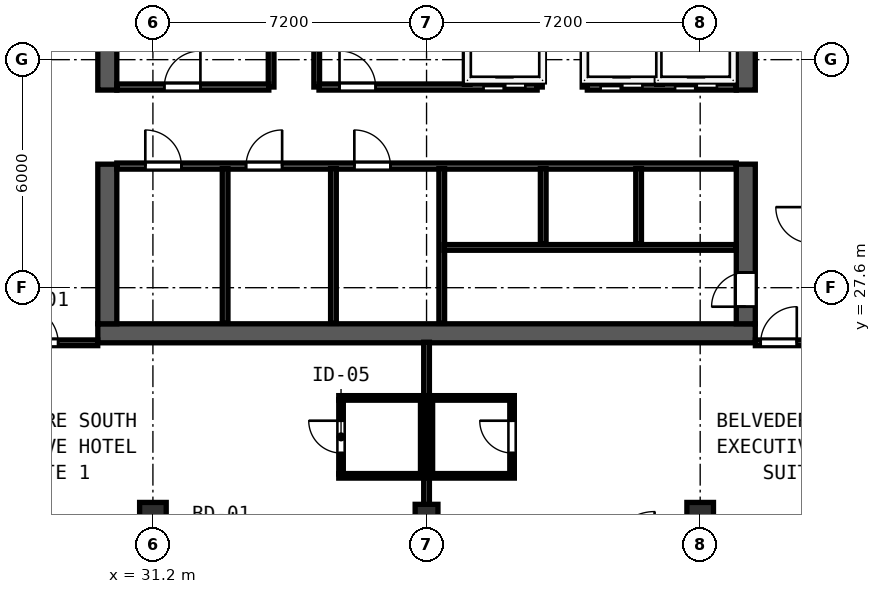
"""IFC4 building model, lengths in metres.
Left out: names, types, materials, properties, quantities, classifications, styles, units other than length and angle.
Written with IfcOpenShell. Run it as: python <this file> out.ifc"""

import sys

from ifc_helpers import new_model, si_unit, direction, frame, frame_2d, origin, origin_2d, place, context, subcontext, project, spatial, rectangle, hollow_rectangle, extrude, element, fill, save


model = new_model("IFC4")
c1 = context("Model", 3, precision=1e-05, world=origin(), true_north=direction((0.0, 1.0)))
c2 = subcontext(c1, "Body", "Model", "MODEL_VIEW")
j1 = project(units=[si_unit("LENGTHUNIT", "METRE"), si_unit("PLANEANGLEUNIT", "RADIAN")], contexts=[c1])
p1 = place(None, origin())
s1 = spatial("IfcSite", under=j1, at=p1, CompositionType="ELEMENT")
p2 = place(p1, origin())
s2 = spatial("IfcBuilding", under=s1, at=p2, CompositionType="ELEMENT")
p3 = place(p2, frame((0.0, 0.0, 286.1)))
s3 = spatial("IfcBuildingStorey", under=s2, at=p3, CompositionType="ELEMENT", Elevation=286.1)
p4 = place(p3, frame((29.75, 26.4, 0.0), z_axis=(0.0, 0.0, 1.0), x_axis=(1.0, 0.0, 0.0)))
e1 = element("IfcWall", 1, at=p4, inside=s3, PredefinedType="SHEAR", context=c2, shape_type="SweptSolid", body=[
    extrude(rectangle(XDim=17.3, YDim=0.5, at=frame_2d((8.65, 0.0))), origin(), (0.0, 0.0, 1.0), 3.72),
])
p5 = place(p3, frame((30.0, 26.65, 0.0), z_axis=(0.0, 0.0, 1.0), x_axis=(0.0, 1.0, 0.0)))
e2 = element("IfcWall", 2, at=p5, inside=s3, PredefinedType="SHEAR", context=c2, shape_type="SweptSolid", body=[
    extrude(rectangle(XDim=4.2, YDim=0.5, at=frame_2d((2.1, 0.0))), origin(), (0.0, 0.0, 1.0), 3.72),
])
p6 = place(p3, frame((30.0, 32.8, 0.0), z_axis=(0.0, 0.0, 1.0), x_axis=(0.0, 1.0, 0.0)))
e3 = element("IfcWall", 3, at=p6, inside=s3, PredefinedType="SHEAR", context=c2, shape_type="SweptSolid", body=[
    extrude(rectangle(XDim=10.15, YDim=0.5, at=frame_2d((5.075, 0.0))), origin(), (0.0, 0.0, 1.0), 3.72),
])
p7 = place(p3, frame((46.8, 26.65, 0.0), z_axis=(0.0, 0.0, 1.0), x_axis=(0.0, 1.0, 0.0)))
e4 = element("IfcWall", 4, at=p7, inside=s3, PredefinedType="SHEAR", context=c2, shape_type="SweptSolid", body=[
    extrude(rectangle(XDim=4.2, YDim=0.5, at=frame_2d((2.1, 0.0))), origin(), (0.0, 0.0, 1.0), 3.72),
])
p8 = place(p7, frame((1.35, 0.0, 0.0), z_axis=(0.0, 0.0, 1.0), x_axis=(-1.0, 0.0, 0.0)))
e5 = element("IfcOpeningElement", 5, at=p8, cuts=e4, PredefinedType="OPENING", context=c2, shape_type="SweptSolid", body=[
    extrude(rectangle(XDim=0.9, YDim=2.1, at=frame_2d((0.45, 1.05))), frame((0.0, 0.26, 0.0), z_axis=(0.0, -1.0, 0.0), x_axis=(1.0, 0.0, 0.0)), (0.0, 0.0, 1.0), 0.52),
])
p9 = place(p3, frame((46.8, 32.8, 0.0), z_axis=(0.0, 0.0, 1.0), x_axis=(0.0, 1.0, 0.0)))
e6 = element("IfcWall", 6, at=p9, inside=s3, PredefinedType="SHEAR", context=c2, shape_type="SweptSolid", body=[
    extrude(rectangle(XDim=10.15, YDim=0.5, at=frame_2d((5.075, 0.0))), origin(), (0.0, 0.0, 1.0), 3.72),
])
for number, where, z_axis, x_axis in (
    (7, (31.2, 21.6, 0.0), (0.0, 0.0, 1.0), (1.0, 0.0, 0.0)),
    (8, (45.6, 21.6, 0.0), (0.0, 0.0, 1.0), (1.0, 0.0, 0.0)),
):
    element("IfcColumn", number, at=place(p3, frame(where, z_axis=z_axis, x_axis=x_axis)), inside=s3, PredefinedType="COLUMN", context=c2, shape_type="SweptSolid", body=[
        extrude(hollow_rectangle(XDim=0.7, YDim=0.7, WallThickness=0.026, at=origin_2d()), origin(), (0.0, 0.0, 1.0), 3.9),
    ])
p10 = place(p3, frame((38.4, 21.6, 0.0), z_axis=(0.0, 0.0, 1.0), x_axis=(1.0, 0.0, 0.0)))
e9 = element("IfcColumn", 9, at=p10, inside=s3, PredefinedType="COLUMN", context=c2, shape_type="SweptSolid", body=[
    extrude(hollow_rectangle(XDim=0.6, YDim=0.6, WallThickness=0.024, at=origin_2d()), origin(), (0.0, 0.0, 1.0), 3.9),
])
p11 = place(p3, frame((47.933, 20.497, 0.0), z_axis=(0.0, 0.0, 1.0), x_axis=(0.970136341762, 0.242560257242, 0.0)))
e10 = element("IfcWall", 10, at=p11, inside=s3, PredefinedType="SOLIDWALL", context=c2, shape_type="SweptSolid", body=[
    extrude(rectangle(XDim=4.664, YDim=0.22, at=frame_2d((2.332, 0.0))), origin(), (0.0, 0.0, 1.0), 3.365),
])
p12 = place(p11, frame((0.7, 0.0, 0.85)))
e11 = element("IfcOpeningElement", 11, at=p12, cuts=e10, PredefinedType="OPENING", context=c2, shape_type="SweptSolid", body=[
    extrude(rectangle(XDim=1.25, YDim=1.95, at=frame_2d((0.625, 0.975))), frame((0.0, 0.12, 0.0), z_axis=(0.0, -1.0, 0.0), x_axis=(1.0, 0.0, 0.0)), (0.0, 0.0, 1.0), 0.24),
])
p13 = place(p3, frame((24.342, 21.628, 0.0), z_axis=(0.0, 0.0, 1.0), x_axis=(0.970136341762, -0.242560257242, 0.0)))
e12 = element("IfcWall", 12, at=p13, inside=s3, PredefinedType="SOLIDWALL", context=c2, shape_type="SweptSolid", body=[
    extrude(rectangle(XDim=4.664, YDim=0.22, at=frame_2d((2.332, 0.0))), origin(), (0.0, 0.0, 1.0), 3.365),
])
p14 = place(p13, frame((0.7, 0.0, 0.85)))
e13 = element("IfcOpeningElement", 13, at=p14, cuts=e12, PredefinedType="OPENING", context=c2, shape_type="SweptSolid", body=[
    extrude(rectangle(XDim=1.25, YDim=1.95, at=frame_2d((0.625, 0.975))), frame((0.0, 0.12, 0.0), z_axis=(0.0, -1.0, 0.0), x_axis=(1.0, 0.0, 0.0)), (0.0, 0.0, 1.0), 0.24),
])
for number, where, z_axis, x_axis in (
    (14, (34.31, 32.88, 0.0), (0.0, 0.0, 1.0), (0.0, 1.0, 0.0)),
    (15, (35.51, 32.88, 0.0), (0.0, 0.0, 1.0), (0.0, 1.0, 0.0)),
    (16, (41.37, 32.88, 0.0), (0.0, 0.0, 1.0), (0.0, 1.0, 0.0)),
    (17, (42.57, 32.88, 0.0), (0.0, 0.0, 1.0), (0.0, 1.0, 0.0)),
):
    element("IfcWall", number, at=place(p3, frame(where, z_axis=z_axis, x_axis=x_axis)), inside=s3, PredefinedType="SOLIDWALL", context=c2, shape_type="SweptSolid", body=[
        extrude(rectangle(XDim=2.17, YDim=0.15, at=frame_2d((1.085, 0.0))), origin(), (0.0, 0.0, 1.0), 3.72),
    ])
p15 = place(p3, frame((30.25, 32.88, 0.0), z_axis=(0.0, 0.0, 1.0), x_axis=(1.0, 0.0, 0.0)))
e18 = element("IfcWall", 18, at=p15, inside=s3, PredefinedType="SOLIDWALL", context=c2, shape_type="SweptSolid", body=[
    extrude(rectangle(XDim=4.0, YDim=0.16, at=frame_2d((2.0, 0.0))), origin(), (0.0, 0.0, 1.0), 3.72),
])
p16 = place(p15, frame((2.2, 0.0, 0.0), z_axis=(0.0, 0.0, 1.0), x_axis=(-1.0, 0.0, 0.0)))
e19 = element("IfcOpeningElement", 19, at=p16, cuts=e18, PredefinedType="OPENING", context=c2, shape_type="SweptSolid", body=[
    extrude(rectangle(XDim=0.95, YDim=2.12, at=frame_2d((0.475, 1.06))), frame((0.0, 0.09, 0.0), z_axis=(0.0, -1.0, 0.0), x_axis=(1.0, 0.0, 0.0)), (0.0, 0.0, 1.0), 0.18),
])
p17 = place(p3, frame((35.57, 32.88, 0.0), z_axis=(0.0, 0.0, 1.0), x_axis=(1.0, 0.0, 0.0)))
e20 = element("IfcWall", 20, at=p17, inside=s3, PredefinedType="SOLIDWALL", context=c2, shape_type="SweptSolid", body=[
    extrude(rectangle(XDim=5.74, YDim=0.16, at=frame_2d((2.87, 0.0))), origin(), (0.0, 0.0, 1.0), 3.72),
])
p18 = place(p17, frame((1.49, 0.0, 0.0), z_axis=(0.0, 0.0, 1.0), x_axis=(-1.0, 0.0, 0.0)))
e21 = element("IfcOpeningElement", 21, at=p18, cuts=e20, PredefinedType="OPENING", context=c2, shape_type="SweptSolid", body=[
    extrude(rectangle(XDim=0.95, YDim=2.12, at=frame_2d((0.475, 1.06))), frame((0.0, 0.09, 0.0), z_axis=(0.0, -1.0, 0.0), x_axis=(1.0, 0.0, 0.0)), (0.0, 0.0, 1.0), 0.18),
])
p19 = place(p17, frame((5.43, 0.0, 0.0), z_axis=(0.0, 0.0, 1.0), x_axis=(-1.0, 0.0, 0.0)))
e22 = element("IfcOpeningElement", 22, at=p19, cuts=e20, PredefinedType="OPENING", context=c2, shape_type="SweptSolid", body=[
    extrude(rectangle(XDim=1.1, YDim=2.2, at=frame_2d((0.55, 1.1))), frame((0.0, 0.09, 0.0), z_axis=(0.0, -1.0, 0.0), x_axis=(1.0, 0.0, 0.0)), (0.0, 0.0, 1.0), 0.18),
])
p20 = place(p3, frame((42.63, 32.88, 0.0), z_axis=(0.0, 0.0, 1.0), x_axis=(1.0, 0.0, 0.0)))
e23 = element("IfcWall", 23, at=p20, inside=s3, PredefinedType="SOLIDWALL", context=c2, shape_type="SweptSolid", body=[
    extrude(rectangle(XDim=3.92, YDim=0.16, at=frame_2d((1.96, 0.0))), origin(), (0.0, 0.0, 1.0), 3.72),
])
p21 = place(p20, frame((1.45, 0.0, 0.0), z_axis=(0.0, 0.0, 1.0), x_axis=(-1.0, 0.0, 0.0)))
e24 = element("IfcOpeningElement", 24, at=p21, cuts=e23, PredefinedType="OPENING", context=c2, shape_type="SweptSolid", body=[
    extrude(rectangle(XDim=1.1, YDim=2.2, at=frame_2d((0.55, 1.1))), frame((0.0, 0.09, 0.0), z_axis=(0.0, -1.0, 0.0), x_axis=(1.0, 0.0, 0.0)), (0.0, 0.0, 1.0), 0.18),
])
p22 = place(p20, frame((3.41, 0.0, 0.0), z_axis=(0.0, 0.0, 1.0), x_axis=(-1.0, 0.0, 0.0)))
e25 = element("IfcOpeningElement", 25, at=p22, cuts=e23, PredefinedType="OPENING", context=c2, shape_type="SweptSolid", body=[
    extrude(rectangle(XDim=1.1, YDim=2.2, at=frame_2d((0.55, 1.1))), frame((0.0, 0.09, 0.0), z_axis=(0.0, -1.0, 0.0), x_axis=(1.0, 0.0, 0.0)), (0.0, 0.0, 1.0), 0.18),
])
for number, where, z_axis, x_axis in (
    (26, (39.47, 32.95, 0.0), (0.0, 0.0, 1.0), (0.0, 1.0, 0.0)),
    (27, (44.53, 32.95, 0.0), (0.0, 0.0, 1.0), (0.0, 1.0, 0.0)),
):
    element("IfcWall", number, at=place(p3, frame(where, z_axis=z_axis, x_axis=x_axis)), inside=s3, PredefinedType="SOLIDWALL", context=c2, shape_type="SweptSolid", body=[
        extrude(rectangle(XDim=2.05, YDim=0.15, at=frame_2d((1.025, 0.0))), origin(), (0.0, 0.0, 1.0), 3.72),
    ])
p23 = place(p3, frame((30.25, 30.8, 0.0), z_axis=(0.0, 0.0, 1.0), x_axis=(1.0, 0.0, 0.0)))
e28 = element("IfcWall", 28, at=p23, inside=s3, PredefinedType="SOLIDWALL", context=c2, shape_type="SweptSolid", body=[
    extrude(rectangle(XDim=16.3, YDim=0.16, at=frame_2d((8.15, 0.0))), origin(), (0.0, 0.0, 1.0), 3.72),
])
p24 = place(p23, frame((0.75, 0.0, 0.0)))
e29 = element("IfcOpeningElement", 29, at=p24, cuts=e28, PredefinedType="OPENING", context=c2, shape_type="SweptSolid", body=[
    extrude(rectangle(XDim=0.95, YDim=2.12, at=frame_2d((0.475, 1.06))), frame((0.0, 0.09, 0.0), z_axis=(0.0, -1.0, 0.0), x_axis=(1.0, 0.0, 0.0)), (0.0, 0.0, 1.0), 0.18),
])
p25 = place(p23, frame((3.4, 0.0, 0.0)))
e30 = element("IfcOpeningElement", 30, at=p25, cuts=e28, PredefinedType="OPENING", context=c2, shape_type="SweptSolid", body=[
    extrude(rectangle(XDim=0.95, YDim=2.12, at=frame_2d((0.475, 1.06))), frame((0.0, 0.09, 0.0), z_axis=(0.0, -1.0, 0.0), x_axis=(1.0, 0.0, 0.0)), (0.0, 0.0, 1.0), 0.18),
])
p26 = place(p23, frame((6.25, 0.0, 0.0)))
e31 = element("IfcOpeningElement", 31, at=p26, cuts=e28, PredefinedType="OPENING", context=c2, shape_type="SweptSolid", body=[
    extrude(rectangle(XDim=0.95, YDim=2.12, at=frame_2d((0.475, 1.06))), frame((0.0, 0.09, 0.0), z_axis=(0.0, -1.0, 0.0), x_axis=(1.0, 0.0, 0.0)), (0.0, 0.0, 1.0), 0.18),
])
p27 = place(p3, frame((38.8, 26.66, 0.0), z_axis=(0.0, 0.0, 1.0), x_axis=(0.0, 1.0, 0.0)))
e32 = element("IfcWall", 32, at=p27, inside=s3, PredefinedType="SOLIDWALL", context=c2, shape_type="SweptSolid", body=[
    extrude(rectangle(XDim=4.075, YDim=0.15, at=frame_2d((2.038, 0.0))), origin(), (0.0, 0.0, 1.0), 3.72),
])
for number, where, z_axis, x_axis in (
    (33, (33.1, 26.66, 0.0), (0.0, 0.0, 1.0), (0.0, 1.0, 0.0)),
    (34, (35.95, 26.66, 0.0), (0.0, 0.0, 1.0), (0.0, 1.0, 0.0)),
):
    element("IfcWall", number, at=place(p3, frame(where, z_axis=z_axis, x_axis=x_axis)), inside=s3, PredefinedType="PARTITIONING", context=c2, shape_type="SweptSolid", body=[
        extrude(rectangle(XDim=4.075, YDim=0.15, at=frame_2d((2.038, 0.0))), origin(), (0.0, 0.0, 1.0), 3.72),
    ])
p28 = place(p3, frame((38.86, 28.66, 0.0), z_axis=(0.0, 0.0, 1.0), x_axis=(1.0, 0.0, 0.0)))
e35 = element("IfcWall", 35, at=p28, inside=s3, PredefinedType="PARTITIONING", context=c2, shape_type="SweptSolid", body=[
    extrude(rectangle(XDim=7.69, YDim=0.15, at=frame_2d((3.845, 0.0))), origin(), (0.0, 0.0, 1.0), 3.72),
])
for number, where, z_axis, x_axis in (
    (36, (41.47, 28.75, 0.0), (0.0, 0.0, 1.0), (0.0, 1.0, 0.0)),
    (37, (43.98, 28.75, 0.0), (0.0, 0.0, 1.0), (0.0, 1.0, 0.0)),
):
    element("IfcWall", number, at=place(p3, frame(where, z_axis=z_axis, x_axis=x_axis)), inside=s3, PredefinedType="SOLIDWALL", context=c2, shape_type="SweptSolid", body=[
        extrude(rectangle(XDim=1.985, YDim=0.15, at=frame_2d((0.993, 0.0))), origin(), (0.0, 0.0, 1.0), 3.72),
    ])
p29 = place(p3, frame((24.212, 26.15, 0.0), z_axis=(0.0, 0.0, 1.0), x_axis=(1.0, 0.0, 0.0)))
e38 = element("IfcWall", 38, at=p29, inside=s3, PredefinedType="PARTITIONING", context=c2, shape_type="SweptSolid", body=[
    extrude(rectangle(XDim=5.536, YDim=0.15, at=frame_2d((2.768, 0.0))), origin(), (0.0, 0.0, 1.0), 3.72),
])
p30 = place(p29, frame((4.495, 0.0, 0.0), z_axis=(0.0, 0.0, 1.0), x_axis=(-1.0, 0.0, 0.0)))
e39 = element("IfcOpeningElement", 39, at=p30, cuts=e38, PredefinedType="OPENING", context=c2, shape_type="SweptSolid", body=[
    extrude(rectangle(XDim=0.95, YDim=2.18, at=frame_2d((0.475, 1.09))), frame((0.0, 0.085, 0.0), z_axis=(0.0, -1.0, 0.0), x_axis=(1.0, 0.0, 0.0)), (0.0, 0.0, 1.0), 0.17),
])
p31 = place(p3, frame((38.4, 20.612, 0.0), z_axis=(0.0, 0.0, 1.0), x_axis=(0.0, 1.0, 0.0)))
e40 = element("IfcWall", 40, at=p31, inside=s3, PredefinedType="PARTITIONING", context=c2, shape_type="SweptSolid", body=[
    extrude(rectangle(XDim=5.553, YDim=0.15, at=frame_2d((2.776, 0.0))), origin(), (0.0, 0.0, 1.0), 3.205),
])
for number, where, z_axis, x_axis in (
    (41, (36.09, 24.7, 0.0), (0.0, 0.0, 1.0), (1.0, 0.0, 0.0)),
    (42, (36.09, 22.65, 0.0), (0.0, 0.0, 1.0), (1.0, 0.0, 0.0)),
):
    element("IfcWall", number, at=place(p3, frame(where, z_axis=z_axis, x_axis=x_axis)), inside=s3, PredefinedType="PARTITIONING", context=c2, shape_type="SweptSolid", body=[
        extrude(rectangle(XDim=2.25, YDim=0.12, at=frame_2d((1.125, 0.0))), origin(), (0.0, 0.0, 1.0), 3.72),
    ])
p32 = place(p3, frame((36.15, 22.695, 0.0), z_axis=(0.0, 0.0, 1.0), x_axis=(0.0, 1.0, 0.0)))
e43 = element("IfcWall", 43, at=p32, inside=s3, PredefinedType="PARTITIONING", context=c2, shape_type="SweptSolid", body=[
    extrude(rectangle(XDim=1.96, YDim=0.12, at=frame_2d((0.98, 0.0))), origin(), (0.0, 0.0, 1.0), 3.72),
])
p33 = place(p32, frame((1.405, 0.0, 0.0), z_axis=(0.0, 0.0, 1.0), x_axis=(-1.0, 0.0, 0.0)))
e44 = element("IfcOpeningElement", 44, at=p33, cuts=e43, PredefinedType="OPENING", context=c2, shape_type="SweptSolid", body=[
    extrude(rectangle(XDim=0.85, YDim=2.1, at=frame_2d((0.425, 1.05))), frame((0.0, 0.07, 0.0), z_axis=(0.0, -1.0, 0.0), x_axis=(1.0, 0.0, 0.0)), (0.0, 0.0, 1.0), 0.14),
])
p34 = place(p3, frame((38.3, 22.695, 0.0), z_axis=(0.0, 0.0, 1.0), x_axis=(0.0, 1.0, 0.0)))
e45 = element("IfcWall", 45, at=p34, inside=s3, PredefinedType="PARTITIONING", context=c2, shape_type="SweptSolid", body=[
    extrude(rectangle(XDim=1.96, YDim=0.12, at=frame_2d((0.98, 0.0))), origin(), (0.0, 0.0, 1.0), 3.255),
])
p35 = place(p3, frame((47.052, 26.15, 0.0), z_axis=(0.0, 0.0, 1.0), x_axis=(1.0, 0.0, 0.0)))
e46 = element("IfcWall", 46, at=p35, inside=s3, PredefinedType="PARTITIONING", context=c2, shape_type="SweptSolid", body=[
    extrude(rectangle(XDim=5.536, YDim=0.15, at=frame_2d((2.768, 0.0))), origin(), (0.0, 0.0, 1.0), 3.72),
])
p36 = place(p35, frame((1.09, 0.0, 0.0), z_axis=(0.0, 0.0, 1.0), x_axis=(-1.0, 0.0, 0.0)))
e47 = element("IfcOpeningElement", 47, at=p36, cuts=e46, PredefinedType="OPENING", context=c2, shape_type="SweptSolid", body=[
    extrude(rectangle(XDim=0.95, YDim=2.18, at=frame_2d((0.475, 1.09))), frame((0.0, 0.085, 0.0), z_axis=(0.0, -1.0, 0.0), x_axis=(1.0, 0.0, 0.0)), (0.0, 0.0, 1.0), 0.17),
])
for number, where, z_axis, x_axis in (
    (48, (38.46, 24.7, 0.0), (0.0, 0.0, 1.0), (1.0, 0.0, 0.0)),
    (49, (38.46, 22.65, 0.0), (0.0, 0.0, 1.0), (1.0, 0.0, 0.0)),
):
    element("IfcWall", number, at=place(p3, frame(where, z_axis=z_axis, x_axis=x_axis)), inside=s3, PredefinedType="PARTITIONING", context=c2, shape_type="SweptSolid", body=[
        extrude(rectangle(XDim=2.25, YDim=0.12, at=frame_2d((1.125, 0.0))), origin(), (0.0, 0.0, 1.0), 3.72),
    ])
p37 = place(p3, frame((38.5, 22.695, 0.0), z_axis=(0.0, 0.0, 1.0), x_axis=(0.0, 1.0, 0.0)))
e50 = element("IfcWall", 50, at=p37, inside=s3, PredefinedType="PARTITIONING", context=c2, shape_type="SweptSolid", body=[
    extrude(rectangle(XDim=1.96, YDim=0.12, at=frame_2d((0.98, 0.0))), origin(), (0.0, 0.0, 1.0), 3.255),
])
p38 = place(p3, frame((40.65, 22.695, 0.0), z_axis=(0.0, 0.0, 1.0), x_axis=(0.0, 1.0, 0.0)))
e51 = element("IfcWall", 51, at=p38, inside=s3, PredefinedType="PARTITIONING", context=c2, shape_type="SweptSolid", body=[
    extrude(rectangle(XDim=1.96, YDim=0.12, at=frame_2d((0.98, 0.0))), origin(), (0.0, 0.0, 1.0), 3.72),
])
p39 = place(p38, frame((0.555, 0.0, 0.0)))
e52 = element("IfcOpeningElement", 52, at=p39, cuts=e51, PredefinedType="OPENING", context=c2, shape_type="SweptSolid", body=[
    extrude(rectangle(XDim=0.85, YDim=2.1, at=frame_2d((0.425, 1.05))), frame((0.0, 0.07, 0.0), z_axis=(0.0, -1.0, 0.0), x_axis=(1.0, 0.0, 0.0)), (0.0, 0.0, 1.0), 0.14),
])
p40 = place(p16, origin())
e53 = element("IfcDoor", 53, at=p40, inside=s3, OperationType="SINGLE_SWING_LEFT", PredefinedType="DOOR", context=c2, shape_type="SweptSolid", body=[
    extrude(rectangle(XDim=0.95, YDim=2.12, at=frame_2d((0.475, 1.06))), frame((0.0, 0.025, 0.0), z_axis=(0.0, -1.0, 0.0), x_axis=(1.0, 0.0, 0.0)), (0.0, 0.0, 1.0), 0.05),
])
fill(e19, e53)
p41 = place(p18, origin())
e54 = element("IfcDoor", 54, at=p41, inside=s3, OperationType="SINGLE_SWING_RIGHT", PredefinedType="DOOR", context=c2, shape_type="SweptSolid", body=[
    extrude(rectangle(XDim=0.95, YDim=2.12, at=frame_2d((0.475, 1.06))), frame((0.0, 0.025, 0.0), z_axis=(0.0, -1.0, 0.0), x_axis=(1.0, 0.0, 0.0)), (0.0, 0.0, 1.0), 0.05),
])
fill(e21, e54)
p42 = place(p19, origin())
e55 = element("IfcDoor", 55, at=p42, inside=s3, OperationType="SLIDING_TO_RIGHT", PredefinedType="DOOR", context=c2, shape_type="SweptSolid", body=[
    extrude(rectangle(XDim=1.1, YDim=2.2, at=frame_2d((0.55, 1.1))), frame((0.0, 0.025, 0.0), z_axis=(0.0, -1.0, 0.0), x_axis=(1.0, 0.0, 0.0)), (0.0, 0.0, 1.0), 0.05),
])
fill(e22, e55)
p43 = place(p21, origin())
e56 = element("IfcDoor", 56, at=p43, inside=s3, OperationType="SLIDING_TO_RIGHT", PredefinedType="DOOR", context=c2, shape_type="SweptSolid", body=[
    extrude(rectangle(XDim=1.1, YDim=2.2, at=frame_2d((0.55, 1.1))), frame((0.0, 0.025, 0.0), z_axis=(0.0, -1.0, 0.0), x_axis=(1.0, 0.0, 0.0)), (0.0, 0.0, 1.0), 0.05),
])
fill(e24, e56)
p44 = place(p22, origin())
e57 = element("IfcDoor", 57, at=p44, inside=s3, OperationType="SLIDING_TO_RIGHT", PredefinedType="DOOR", context=c2, shape_type="SweptSolid", body=[
    extrude(rectangle(XDim=1.1, YDim=2.2, at=frame_2d((0.55, 1.1))), frame((0.0, 0.025, 0.0), z_axis=(0.0, -1.0, 0.0), x_axis=(1.0, 0.0, 0.0)), (0.0, 0.0, 1.0), 0.05),
])
fill(e25, e57)
p45 = place(p24, origin())
e58 = element("IfcDoor", 58, at=p45, inside=s3, OperationType="SINGLE_SWING_LEFT", PredefinedType="DOOR", context=c2, shape_type="SweptSolid", body=[
    extrude(rectangle(XDim=0.95, YDim=2.12, at=frame_2d((0.475, 1.06))), frame((0.0, 0.025, 0.0), z_axis=(0.0, -1.0, 0.0), x_axis=(1.0, 0.0, 0.0)), (0.0, 0.0, 1.0), 0.05),
])
fill(e29, e58)
p46 = place(p25, origin())
e59 = element("IfcDoor", 59, at=p46, inside=s3, OperationType="SINGLE_SWING_RIGHT", PredefinedType="DOOR", context=c2, shape_type="SweptSolid", body=[
    extrude(rectangle(XDim=0.95, YDim=2.12, at=frame_2d((0.475, 1.06))), frame((0.0, 0.025, 0.0), z_axis=(0.0, -1.0, 0.0), x_axis=(1.0, 0.0, 0.0)), (0.0, 0.0, 1.0), 0.05),
])
fill(e30, e59)
p47 = place(p26, origin())
e60 = element("IfcDoor", 60, at=p47, inside=s3, OperationType="SINGLE_SWING_LEFT", PredefinedType="DOOR", context=c2, shape_type="SweptSolid", body=[
    extrude(rectangle(XDim=0.95, YDim=2.12, at=frame_2d((0.475, 1.06))), frame((0.0, 0.025, 0.0), z_axis=(0.0, -1.0, 0.0), x_axis=(1.0, 0.0, 0.0)), (0.0, 0.0, 1.0), 0.05),
])
fill(e31, e60)
p48 = place(p8, origin())
e61 = element("IfcDoor", 61, at=p48, inside=s3, OperationType="SINGLE_SWING_RIGHT", PredefinedType="DOOR", context=c2, shape_type="SweptSolid", body=[
    extrude(rectangle(XDim=0.9, YDim=2.1, at=frame_2d((0.45, 1.05))), frame((0.0, -0.135, 0.0), z_axis=(0.0, -1.0, 0.0), x_axis=(1.0, 0.0, 0.0)), (0.0, 0.0, 1.0), 0.05),
])
fill(e5, e61)
p49 = place(p30, origin())
e62 = element("IfcDoor", 62, at=p49, inside=s3, OperationType="SINGLE_SWING_RIGHT", PredefinedType="DOOR", context=c2, shape_type="SweptSolid", body=[
    extrude(rectangle(XDim=0.95, YDim=2.18, at=frame_2d((0.475, 1.09))), frame((0.0, 0.025, 0.0), z_axis=(0.0, -1.0, 0.0), x_axis=(1.0, 0.0, 0.0)), (0.0, 0.0, 1.0), 0.05),
])
fill(e39, e62)
p50 = place(p33, origin())
e63 = element("IfcDoor", 63, at=p50, inside=s3, OperationType="SINGLE_SWING_LEFT", PredefinedType="DOOR", context=c2, shape_type="SweptSolid", body=[
    extrude(rectangle(XDim=0.85, YDim=2.1, at=frame_2d((0.425, 1.05))), frame((0.0, 0.025, 0.0), z_axis=(0.0, -1.0, 0.0), x_axis=(1.0, 0.0, 0.0)), (0.0, 0.0, 1.0), 0.05),
])
fill(e44, e63)
p51 = place(p36, origin())
e64 = element("IfcDoor", 64, at=p51, inside=s3, OperationType="SINGLE_SWING_LEFT", PredefinedType="DOOR", context=c2, shape_type="SweptSolid", body=[
    extrude(rectangle(XDim=0.95, YDim=2.18, at=frame_2d((0.475, 1.09))), frame((0.0, 0.025, 0.0), z_axis=(0.0, -1.0, 0.0), x_axis=(1.0, 0.0, 0.0)), (0.0, 0.0, 1.0), 0.05),
])
fill(e47, e64)
p52 = place(p39, origin())
e65 = element("IfcDoor", 65, at=p52, inside=s3, OperationType="SINGLE_SWING_RIGHT", PredefinedType="DOOR", context=c2, shape_type="SweptSolid", body=[
    extrude(rectangle(XDim=0.85, YDim=2.1, at=frame_2d((0.425, 1.05))), frame((0.0, 0.025, 0.0), z_axis=(0.0, -1.0, 0.0), x_axis=(1.0, 0.0, 0.0)), (0.0, 0.0, 1.0), 0.05),
])
fill(e52, e65)
save(model, sys.argv[1])
